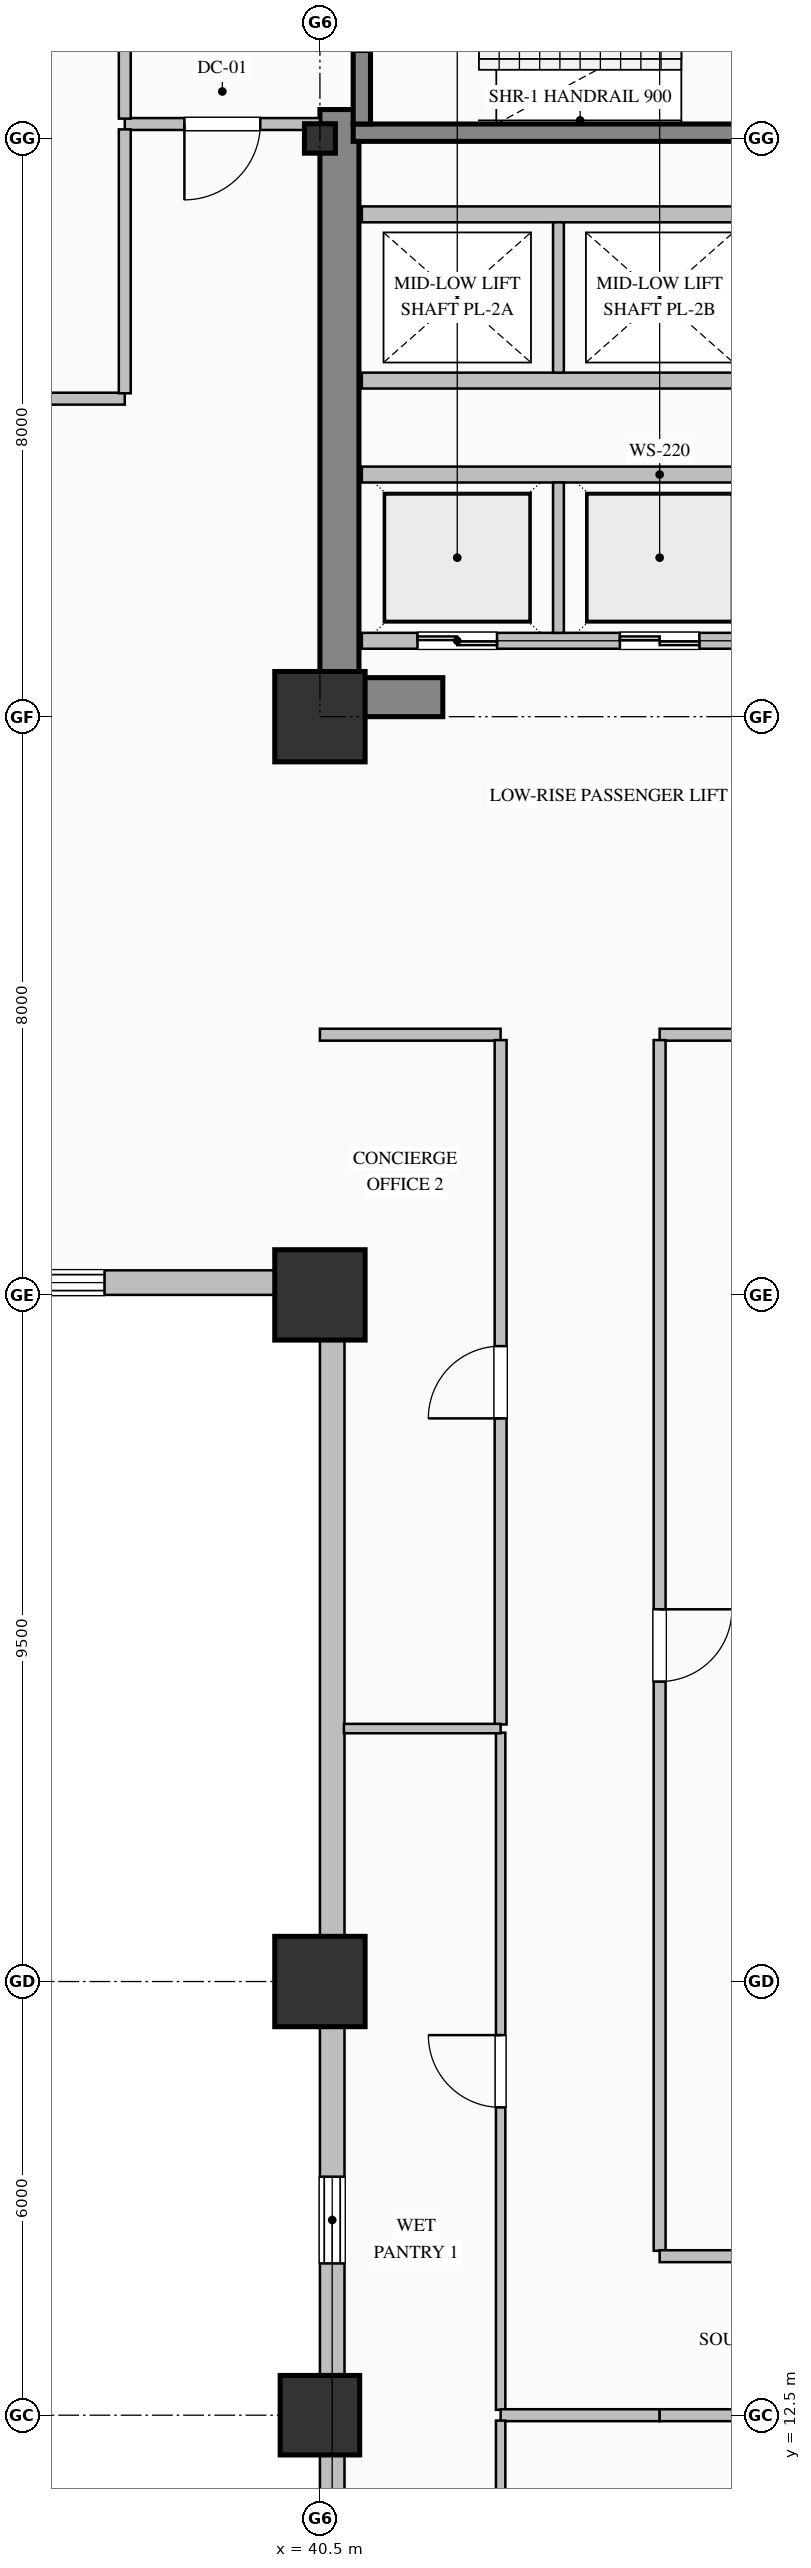
"""IFC4 building model, lengths in metres.
Left out: names, types, materials, properties, quantities, classifications, styles, units other than length and angle.
Written with IfcOpenShell. Run it as: python <this file> out.ifc"""

import sys

from ifc_helpers import new_model, si_unit, direction, frame, frame_2d, origin, origin_2d, place, context, subcontext, project, spatial, rectangle, hollow_rectangle, i_section, extrude, element, fill, save


model = new_model("IFC4")
c1 = context("Model", 3, precision=1e-05, world=origin(), true_north=direction((0.0, 1.0)))
c2 = subcontext(c1, "Body", "Model", "MODEL_VIEW")
j1 = project(units=[si_unit("LENGTHUNIT", "METRE"), si_unit("PLANEANGLEUNIT", "RADIAN")], contexts=[c1])
p1 = place(None, origin())
s1 = spatial("IfcSite", under=j1, at=p1, CompositionType="ELEMENT")
p2 = place(p1, origin())
s2 = spatial("IfcBuilding", under=s1, at=p2, CompositionType="ELEMENT")
p3 = place(p2, frame((0.0, 0.0, 68.2)))
s3 = spatial("IfcBuildingStorey", under=s2, at=p3, CompositionType="ELEMENT", Elevation=68.2)
p4 = place(p3, frame((40.77, 36.54, 0.0), z_axis=(0.0, 0.0, 1.0), x_axis=(0.0, 1.0, 0.0)))
e1 = element("IfcWall", 1, at=p4, inside=s3, PredefinedType="SHEAR", context=c2, shape_type="SweptSolid", body=[
    extrude(rectangle(XDim=7.86, YDim=0.54, at=frame_2d((3.93, 0.0))), origin(), (0.0, 0.0, 1.0), 3.75),
])
p5 = place(p3, frame((40.5, 36.27, 0.0), z_axis=(0.0, 0.0, 1.0), x_axis=(1.0, 0.0, 0.0)))
e2 = element("IfcWall", 2, at=p5, inside=s3, PredefinedType="SHEAR", context=c2, shape_type="SweptSolid", body=[
    extrude(rectangle(XDim=1.7, YDim=0.54, at=frame_2d((0.85, 0.0))), origin(), (0.0, 0.0, 1.0), 3.75),
])
p6 = place(p3, frame((40.5, 12.5, 0.0), z_axis=(0.0, 0.0, 1.0), x_axis=(1.0, 0.0, 0.0)))
e3 = element("IfcColumn", 3, at=p6, inside=s3, PredefinedType="COLUMN", context=c2, shape_type="SweptSolid", body=[
    extrude(hollow_rectangle(XDim=1.1, YDim=1.1, WallThickness=0.04, at=origin_2d()), origin(), (0.0, 0.0, 1.0), 4.0),
])
for number, where, z_axis, x_axis in (
    (4, (40.5, 18.5, 0.0), (0.0, 0.0, 1.0), (1.0, 0.0, 0.0)),
    (5, (40.5, 28.0, 0.0), (0.0, 0.0, 1.0), (1.0, 0.0, 0.0)),
    (6, (40.5, 36.0, 0.0), (0.0, 0.0, 1.0), (1.0, 0.0, 0.0)),
):
    element("IfcColumn", number, at=place(p3, frame(where, z_axis=z_axis, x_axis=x_axis)), inside=s3, PredefinedType="COLUMN", context=c2, shape_type="SweptSolid", body=[
        extrude(hollow_rectangle(XDim=1.25, YDim=1.25, WallThickness=0.045, at=origin_2d()), origin(), (0.0, 0.0, 1.0), 4.0),
    ])
p7 = place(p3, frame((40.5, 44.0, 0.0), z_axis=(0.0, 0.0, 1.0), x_axis=(1.0, 0.0, 0.0)))
e7 = element("IfcColumn", 7, at=p7, inside=s3, PredefinedType="COLUMN", context=c2, shape_type="SweptSolid", body=[
    extrude(i_section(OverallWidth=0.407, OverallDepth=0.428, WebThickness=0.02, FlangeThickness=0.035, FilletRadius=0.022, at=origin_2d()), origin(), (0.0, 0.0, 1.0), 4.0),
])
p8 = place(p3, frame((40.67, 8.0, 0.0), z_axis=(0.0, 0.0, 1.0), x_axis=(0.0, 1.0, 0.0)))
e8 = element("IfcWall", 8, at=p8, inside=s3, PredefinedType="SOLIDWALL", context=c2, shape_type="SweptSolid", body=[
    extrude(rectangle(XDim=20.34, YDim=0.34, at=frame_2d((10.17, 0.0))), origin(), (0.0, 0.0, 1.0), 3.05),
])
p9 = place(p8, frame((6.6, 0.0, 0.7)))
e9 = element("IfcOpeningElement", 9, at=p9, cuts=e8, PredefinedType="OPENING", context=c2, shape_type="SweptSolid", body=[
    extrude(rectangle(XDim=1.2, YDim=1.85, at=frame_2d((0.6, 0.925))), frame((0.0, 0.18, 0.0), z_axis=(0.0, -1.0, 0.0), x_axis=(1.0, 0.0, 0.0)), (0.0, 0.0, 1.0), 0.36),
])
p10 = place(p3, frame((40.52, 28.17, 0.0), z_axis=(0.0, 0.0, 1.0), x_axis=(-1.0, 0.0, 0.0)))
e10 = element("IfcWall", 10, at=p10, inside=s3, PredefinedType="SOLIDWALL", context=c2, shape_type="SweptSolid", body=[
    extrude(rectangle(XDim=36.52, YDim=0.34, at=frame_2d((18.26, 0.0))), origin(), (0.0, 0.0, 1.0), 3.05),
])
p11 = place(p10, frame((3.0, 0.0, 0.7)))
e11 = element("IfcOpeningElement", 11, at=p11, cuts=e10, PredefinedType="OPENING", context=c2, shape_type="SweptSolid", body=[
    extrude(rectangle(XDim=1.2, YDim=1.85, at=frame_2d((0.6, 0.925))), frame((0.0, 0.18, 0.0), z_axis=(0.0, -1.0, 0.0), x_axis=(1.0, 0.0, 0.0)), (0.0, 0.0, 1.0), 0.36),
])
p12 = place(p10, frame((10.2, 0.0, 0.7)))
e12 = element("IfcOpeningElement", 12, at=p12, cuts=e10, PredefinedType="OPENING", context=c2, shape_type="SweptSolid", body=[
    extrude(rectangle(XDim=1.2, YDim=1.85, at=frame_2d((0.6, 0.925))), frame((0.0, 0.18, 0.0), z_axis=(0.0, -1.0, 0.0), x_axis=(1.0, 0.0, 0.0)), (0.0, 0.0, 1.0), 0.36),
])
p13 = place(p10, frame((13.8, 0.0, 0.7)))
e13 = element("IfcOpeningElement", 13, at=p13, cuts=e10, PredefinedType="OPENING", context=c2, shape_type="SweptSolid", body=[
    extrude(rectangle(XDim=1.2, YDim=1.85, at=frame_2d((0.6, 0.925))), frame((0.0, 0.18, 0.0), z_axis=(0.0, -1.0, 0.0), x_axis=(1.0, 0.0, 0.0)), (0.0, 0.0, 1.0), 0.36),
])
p14 = place(p10, frame((17.4, 0.0, 0.7)))
e14 = element("IfcOpeningElement", 14, at=p14, cuts=e10, PredefinedType="OPENING", context=c2, shape_type="SweptSolid", body=[
    extrude(rectangle(XDim=1.2, YDim=1.85, at=frame_2d((0.6, 0.925))), frame((0.0, 0.18, 0.0), z_axis=(0.0, -1.0, 0.0), x_axis=(1.0, 0.0, 0.0)), (0.0, 0.0, 1.0), 0.36),
])
p15 = place(p10, frame((21.0, 0.0, 0.7)))
e15 = element("IfcOpeningElement", 15, at=p15, cuts=e10, PredefinedType="OPENING", context=c2, shape_type="SweptSolid", body=[
    extrude(rectangle(XDim=1.2, YDim=1.85, at=frame_2d((0.6, 0.925))), frame((0.0, 0.18, 0.0), z_axis=(0.0, -1.0, 0.0), x_axis=(1.0, 0.0, 0.0)), (0.0, 0.0, 1.0), 0.36),
])
p16 = place(p10, frame((28.2, 0.0, 0.7)))
e16 = element("IfcOpeningElement", 16, at=p16, cuts=e10, PredefinedType="OPENING", context=c2, shape_type="SweptSolid", body=[
    extrude(rectangle(XDim=1.2, YDim=1.85, at=frame_2d((0.6, 0.925))), frame((0.0, 0.18, 0.0), z_axis=(0.0, -1.0, 0.0), x_axis=(1.0, 0.0, 0.0)), (0.0, 0.0, 1.0), 0.36),
])
p17 = place(p3, frame((49.04, 44.08, 0.0), z_axis=(0.0, 0.0, 1.0), x_axis=(-1.0, 0.0, 0.0)))
e17 = element("IfcWall", 17, at=p17, inside=s3, PredefinedType="SOLIDWALL", context=c2, shape_type="SweptSolid", body=[
    extrude(rectangle(XDim=8.08, YDim=0.24, at=frame_2d((4.04, 0.0))), origin(), (0.0, 0.0, 1.0), 4.0),
])
p18 = place(p3, frame((41.08, 47.35, 0.0), z_axis=(0.0, 0.0, 1.0), x_axis=(0.0, -1.0, 0.0)))
e18 = element("IfcWall", 18, at=p18, inside=s3, PredefinedType="SOLIDWALL", context=c2, shape_type="SweptSolid", body=[
    extrude(rectangle(XDim=3.15, YDim=0.24, at=frame_2d((1.575, 0.0))), origin(), (0.0, 0.0, 1.0), 4.0),
])
p19 = place(p18, frame((1.0, 0.0, 0.0)))
e19 = element("IfcOpeningElement", 19, at=p19, cuts=e18, PredefinedType="OPENING", context=c2, shape_type="SweptSolid", body=[
    extrude(rectangle(XDim=1.15, YDim=2.2, at=frame_2d((0.575, 1.1))), frame((0.0, 0.13, 0.0), z_axis=(0.0, -1.0, 0.0), x_axis=(1.0, 0.0, 0.0)), (0.0, 0.0, 1.0), 0.26),
])
p20 = place(p3, frame((49.32, 37.05, 0.0), z_axis=(0.0, 0.0, 1.0), x_axis=(-1.0, 0.0, 0.0)))
e20 = element("IfcWall", 20, at=p20, inside=s3, PredefinedType="PARTITIONING", context=c2, shape_type="SweptSolid", body=[
    extrude(rectangle(XDim=8.24, YDim=0.22, at=frame_2d((4.12, 0.0))), origin(), (0.0, 0.0, 1.0), 3.75),
])
p21 = place(p20, frame((6.37, 0.0, 0.0)))
e21 = element("IfcOpeningElement", 21, at=p21, cuts=e20, PredefinedType="OPENING", context=c2, shape_type="SweptSolid", body=[
    extrude(rectangle(XDim=1.1, YDim=2.2, at=frame_2d((0.55, 1.1))), frame((0.0, 0.12, 0.0), z_axis=(0.0, -1.0, 0.0), x_axis=(1.0, 0.0, 0.0)), (0.0, 0.0, 1.0), 0.24),
])
p22 = place(p20, frame((3.57, 0.0, 0.0)))
e22 = element("IfcOpeningElement", 22, at=p22, cuts=e20, PredefinedType="OPENING", context=c2, shape_type="SweptSolid", body=[
    extrude(rectangle(XDim=1.1, YDim=2.2, at=frame_2d((0.55, 1.1))), frame((0.0, 0.12, 0.0), z_axis=(0.0, -1.0, 0.0), x_axis=(1.0, 0.0, 0.0)), (0.0, 0.0, 1.0), 0.24),
])
p23 = place(p20, frame((0.77, 0.0, 0.0)))
e23 = element("IfcOpeningElement", 23, at=p23, cuts=e20, PredefinedType="OPENING", context=c2, shape_type="SweptSolid", body=[
    extrude(rectangle(XDim=1.1, YDim=2.2, at=frame_2d((0.55, 1.1))), frame((0.0, 0.12, 0.0), z_axis=(0.0, -1.0, 0.0), x_axis=(1.0, 0.0, 0.0)), (0.0, 0.0, 1.0), 0.24),
])
p24 = place(p3, frame((41.08, 39.35, 0.0), z_axis=(0.0, 0.0, 1.0), x_axis=(1.0, 0.0, 0.0)))
e24 = element("IfcWall", 24, at=p24, inside=s3, PredefinedType="PARTITIONING", context=c2, shape_type="SweptSolid", body=[
    extrude(rectangle(XDim=8.24, YDim=0.22, at=frame_2d((4.12, 0.0))), origin(), (0.0, 0.0, 1.0), 3.75),
])
p25 = place(p3, frame((43.8, 37.16, 0.0), z_axis=(0.0, 0.0, 1.0), x_axis=(0.0, 1.0, 0.0)))
e25 = element("IfcWall", 25, at=p25, inside=s3, PredefinedType="PARTITIONING", context=c2, shape_type="SweptSolid", body=[
    extrude(rectangle(XDim=2.08, YDim=0.15, at=frame_2d((1.04, 0.0))), origin(), (0.0, 0.0, 1.0), 3.75),
])
for number, where, z_axis, x_axis in (
    (26, (49.32, 40.65, 0.0), (0.0, 0.0, 1.0), (-1.0, 0.0, 0.0)),
    (27, (41.08, 42.95, 0.0), (0.0, 0.0, 1.0), (1.0, 0.0, 0.0)),
):
    element("IfcWall", number, at=place(p3, frame(where, z_axis=z_axis, x_axis=x_axis)), inside=s3, PredefinedType="PARTITIONING", context=c2, shape_type="SweptSolid", body=[
        extrude(rectangle(XDim=8.24, YDim=0.22, at=frame_2d((4.12, 0.0))), origin(), (0.0, 0.0, 1.0), 3.75),
    ])
p26 = place(p3, frame((43.8, 40.76, 0.0), z_axis=(0.0, 0.0, 1.0), x_axis=(0.0, 1.0, 0.0)))
e28 = element("IfcWall", 28, at=p26, inside=s3, PredefinedType="PARTITIONING", context=c2, shape_type="SweptSolid", body=[
    extrude(rectangle(XDim=2.08, YDim=0.15, at=frame_2d((1.04, 0.0))), origin(), (0.0, 0.0, 1.0), 3.75),
])
p27 = place(p3, frame((40.5, 44.2, 0.0), z_axis=(0.0, 0.0, 1.0), x_axis=(-1.0, 0.0, 0.0)))
e29 = element("IfcWall", 29, at=p27, inside=s3, PredefinedType="PARTITIONING", context=c2, shape_type="SweptSolid", body=[
    extrude(rectangle(XDim=2.7, YDim=0.165, at=frame_2d((1.35, 0.0))), origin(), (0.0, 0.0, 1.0), 3.75),
])
p28 = place(p27, frame((0.825, 0.0, 0.0)))
e30 = element("IfcOpeningElement", 30, at=p28, cuts=e29, PredefinedType="OPENING", context=c2, shape_type="SweptSolid", body=[
    extrude(rectangle(XDim=1.05, YDim=2.15, at=frame_2d((0.525, 1.075))), frame((0.0, 0.093, 0.0), z_axis=(0.0, -1.0, 0.0), x_axis=(1.0, 0.0, 0.0)), (0.0, 0.0, 1.0), 0.185),
])
p29 = place(p3, frame((37.8, 44.274, 0.0), z_axis=(0.0, 0.0, 1.0), x_axis=(0.0, 1.0, 0.0)))
e31 = element("IfcWall", 31, at=p29, inside=s3, PredefinedType="PARTITIONING", context=c2, shape_type="SweptSolid", body=[
    extrude(rectangle(XDim=3.051, YDim=0.165, at=frame_2d((1.525, 0.0))), origin(), (0.0, 0.0, 1.0), 3.75),
])
p30 = place(p3, frame((24.5, 40.4, 0.0), z_axis=(0.0, 0.0, 1.0), x_axis=(1.0, 0.0, 0.0)))
e32 = element("IfcWall", 32, at=p30, inside=s3, PredefinedType="PARTITIONING", context=c2, shape_type="SweptSolid", body=[
    extrude(rectangle(XDim=13.3, YDim=0.165, at=frame_2d((6.65, 0.0))), origin(), (0.0, 0.0, 1.0), 3.75),
])
p31 = place(p30, frame((6.15, 0.0, 0.0)))
e33 = element("IfcOpeningElement", 33, at=p31, cuts=e32, PredefinedType="OPENING", context=c2, shape_type="SweptSolid", body=[
    extrude(rectangle(XDim=1.0, YDim=2.15, at=frame_2d((0.5, 1.075))), frame((0.0, 0.093, 0.0), z_axis=(0.0, -1.0, 0.0), x_axis=(1.0, 0.0, 0.0)), (0.0, 0.0, 1.0), 0.185),
])
p32 = place(p3, frame((37.8, 40.475, 0.0), z_axis=(0.0, 0.0, 1.0), x_axis=(0.0, 1.0, 0.0)))
e34 = element("IfcWall", 34, at=p32, inside=s3, PredefinedType="PARTITIONING", context=c2, shape_type="SweptSolid", body=[
    extrude(rectangle(XDim=3.651, YDim=0.165, at=frame_2d((1.825, 0.0))), origin(), (0.0, 0.0, 1.0), 3.75),
])
p33 = place(p3, frame((51.5, 31.6, 0.0), z_axis=(0.0, 0.0, 1.0), x_axis=(-1.0, 0.0, 0.0)))
e35 = element("IfcWall", 35, at=p33, inside=s3, PredefinedType="PARTITIONING", context=c2, shape_type="SweptSolid", body=[
    extrude(rectangle(XDim=6.3, YDim=0.165, at=frame_2d((3.15, 0.0))), origin(), (0.0, 0.0, 1.0), 3.75),
])
p34 = place(p3, frame((43.0, 31.6, 0.0), z_axis=(0.0, 0.0, 1.0), x_axis=(-1.0, 0.0, 0.0)))
e36 = element("IfcWall", 36, at=p34, inside=s3, PredefinedType="PARTITIONING", context=c2, shape_type="SweptSolid", body=[
    extrude(rectangle(XDim=2.5, YDim=0.165, at=frame_2d((1.25, 0.0))), origin(), (0.0, 0.0, 1.0), 3.75),
])
p35 = place(p3, frame((45.2, 31.525, 0.0), z_axis=(0.0, 0.0, 1.0), x_axis=(0.0, -1.0, 0.0)))
e37 = element("IfcWall", 37, at=p35, inside=s3, PredefinedType="PARTITIONING", context=c2, shape_type="SweptSolid", body=[
    extrude(rectangle(XDim=16.751, YDim=0.165, at=frame_2d((8.375, 0.0))), origin(), (0.0, 0.0, 1.0), 3.75),
])
p36 = place(p35, frame((7.875, 0.0, 0.0)))
e38 = element("IfcOpeningElement", 38, at=p36, cuts=e37, PredefinedType="OPENING", context=c2, shape_type="SweptSolid", body=[
    extrude(rectangle(XDim=1.0, YDim=2.15, at=frame_2d((0.5, 1.075))), frame((0.0, 0.093, 0.0), z_axis=(0.0, -1.0, 0.0), x_axis=(1.0, 0.0, 0.0)), (0.0, 0.0, 1.0), 0.185),
])
p37 = place(p3, frame((43.0, 12.574, 0.0), z_axis=(0.0, 0.0, 1.0), x_axis=(0.0, 1.0, 0.0)))
e39 = element("IfcWall", 39, at=p37, inside=s3, PredefinedType="PARTITIONING", context=c2, shape_type="SweptSolid", body=[
    extrude(rectangle(XDim=9.369, YDim=0.13, at=frame_2d((4.684, 0.0))), origin(), (0.0, 0.0, 1.0), 3.75),
])
p38 = place(p37, frame((4.184, 0.0, 0.0)))
e40 = element("IfcOpeningElement", 40, at=p38, cuts=e39, PredefinedType="OPENING", context=c2, shape_type="SweptSolid", body=[
    extrude(rectangle(XDim=1.0, YDim=2.15, at=frame_2d((0.5, 1.075))), frame((0.0, 0.075, 0.0), z_axis=(0.0, -1.0, 0.0), x_axis=(1.0, 0.0, 0.0)), (0.0, 0.0, 1.0), 0.15),
])
p39 = place(p3, frame((43.0, 22.057, 0.0), z_axis=(0.0, 0.0, 1.0), x_axis=(0.0, 1.0, 0.0)))
e41 = element("IfcWall", 41, at=p39, inside=s3, PredefinedType="PARTITIONING", context=c2, shape_type="SweptSolid", body=[
    extrude(rectangle(XDim=9.469, YDim=0.165, at=frame_2d((4.734, 0.0))), origin(), (0.0, 0.0, 1.0), 3.75),
])
p40 = place(p39, frame((4.234, 0.0, 0.0)))
e42 = element("IfcOpeningElement", 42, at=p40, cuts=e41, PredefinedType="OPENING", context=c2, shape_type="SweptSolid", body=[
    extrude(rectangle(XDim=1.0, YDim=2.15, at=frame_2d((0.5, 1.075))), frame((0.0, 0.093, 0.0), z_axis=(0.0, -1.0, 0.0), x_axis=(1.0, 0.0, 0.0)), (0.0, 0.0, 1.0), 0.185),
])
p41 = place(p3, frame((45.2, 12.5, 0.0), z_axis=(0.0, 0.0, 1.0), x_axis=(-1.0, 0.0, 0.0)))
e43 = element("IfcWall", 43, at=p41, inside=s3, PredefinedType="PARTITIONING", context=c2, shape_type="SweptSolid", body=[
    extrude(rectangle(XDim=2.2, YDim=0.165, at=frame_2d((1.1, 0.0))), origin(), (0.0, 0.0, 1.0), 3.042),
])
p42 = place(p3, frame((45.2, 14.7, 0.0), z_axis=(0.0, 0.0, 1.0), x_axis=(1.0, 0.0, 0.0)))
e44 = element("IfcWall", 44, at=p42, inside=s3, PredefinedType="PARTITIONING", context=c2, shape_type="SweptSolid", body=[
    extrude(rectangle(XDim=6.3, YDim=0.165, at=frame_2d((3.15, 0.0))), origin(), (0.0, 0.0, 1.0), 3.75),
])
p43 = place(p3, frame((53.5, 12.5, 0.0), z_axis=(0.0, 0.0, 1.0), x_axis=(-1.0, 0.0, 0.0)))
e45 = element("IfcWall", 45, at=p43, inside=s3, PredefinedType="PARTITIONING", context=c2, shape_type="SweptSolid", body=[
    extrude(rectangle(XDim=8.3, YDim=0.165, at=frame_2d((4.15, 0.0))), origin(), (0.0, 0.0, 1.0), 3.042),
])
p44 = place(p43, frame((3.65, 0.0, 0.0)))
e46 = element("IfcOpeningElement", 46, at=p44, cuts=e45, PredefinedType="OPENING", context=c2, shape_type="SweptSolid", body=[
    extrude(rectangle(XDim=1.0, YDim=2.15, at=frame_2d((0.5, 1.075))), frame((0.0, 0.093, 0.0), z_axis=(0.0, -1.0, 0.0), x_axis=(1.0, 0.0, 0.0)), (0.0, 0.0, 1.0), 0.185),
])
p45 = place(p3, frame((40.832, 22.0, 0.0), z_axis=(0.0, 0.0, 1.0), x_axis=(1.0, 0.0, 0.0)))
e47 = element("IfcWall", 47, at=p45, inside=s3, PredefinedType="PARTITIONING", context=c2, shape_type="SweptSolid", body=[
    extrude(rectangle(XDim=2.168, YDim=0.13, at=frame_2d((1.084, 0.0))), origin(), (0.0, 0.0, 1.0), 3.75),
])
p46 = place(p3, frame((43.0, 12.426, 0.0), z_axis=(0.0, 0.0, 1.0), x_axis=(0.0, -1.0, 0.0)))
e48 = element("IfcWall", 48, at=p46, inside=s3, PredefinedType="PARTITIONING", context=c2, shape_type="SweptSolid", body=[
    extrude(rectangle(XDim=6.456, YDim=0.13, at=frame_2d((3.228, 0.0))), origin(), (0.0, 0.0, 1.0), 3.75),
])
p47 = place(p9, origin())
e49 = element("IfcWindow", 49, at=p47, inside=s3, PartitioningType="DOUBLE_PANEL_VERTICAL", PredefinedType="WINDOW", context=c2, shape_type="SweptSolid", body=[
    extrude(rectangle(XDim=1.2, YDim=1.85, at=frame_2d((0.6, 0.925))), frame((0.0, 0.15, 0.0), z_axis=(0.0, -1.0, 0.0), x_axis=(1.0, 0.0, 0.0)), (0.0, 0.0, 1.0), 0.06),
])
fill(e9, e49)
p48 = place(p11, origin())
e50 = element("IfcWindow", 50, at=p48, inside=s3, PartitioningType="DOUBLE_PANEL_VERTICAL", PredefinedType="WINDOW", context=c2, shape_type="SweptSolid", body=[
    extrude(rectangle(XDim=1.2, YDim=1.85, at=frame_2d((0.6, 0.925))), frame((0.0, 0.15, 0.0), z_axis=(0.0, -1.0, 0.0), x_axis=(1.0, 0.0, 0.0)), (0.0, 0.0, 1.0), 0.06),
])
fill(e11, e50)
p49 = place(p21, origin())
e51 = element("IfcDoor", 51, at=p49, inside=s3, OperationType="DOUBLE_DOOR_SLIDING", PredefinedType="DOOR", context=c2, shape_type="SweptSolid", body=[
    extrude(rectangle(XDim=1.1, YDim=2.2, at=frame_2d((0.55, 1.1))), frame((0.0, 0.025, 0.0), z_axis=(0.0, -1.0, 0.0), x_axis=(1.0, 0.0, 0.0)), (0.0, 0.0, 1.0), 0.05),
])
fill(e21, e51)
p50 = place(p22, origin())
e52 = element("IfcDoor", 52, at=p50, inside=s3, OperationType="DOUBLE_DOOR_SLIDING", PredefinedType="DOOR", context=c2, shape_type="SweptSolid", body=[
    extrude(rectangle(XDim=1.1, YDim=2.2, at=frame_2d((0.55, 1.1))), frame((0.0, 0.025, 0.0), z_axis=(0.0, -1.0, 0.0), x_axis=(1.0, 0.0, 0.0)), (0.0, 0.0, 1.0), 0.05),
])
fill(e22, e52)
p51 = place(p28, origin())
e53 = element("IfcDoor", 53, at=p51, inside=s3, OperationType="SINGLE_SWING_RIGHT", PredefinedType="DOOR", context=c2, shape_type="SweptSolid", body=[
    extrude(rectangle(XDim=1.05, YDim=2.15, at=frame_2d((0.525, 1.075))), frame((0.0, 0.025, 0.0), z_axis=(0.0, -1.0, 0.0), x_axis=(1.0, 0.0, 0.0)), (0.0, 0.0, 1.0), 0.05),
])
fill(e30, e53)
p52 = place(p36, origin())
e54 = element("IfcDoor", 54, at=p52, inside=s3, OperationType="SINGLE_SWING_LEFT", PredefinedType="DOOR", context=c2, shape_type="SweptSolid", body=[
    extrude(rectangle(XDim=1.0, YDim=2.15, at=frame_2d((0.5, 1.075))), frame((0.0, 0.025, 0.0), z_axis=(0.0, -1.0, 0.0), x_axis=(1.0, 0.0, 0.0)), (0.0, 0.0, 1.0), 0.05),
])
fill(e38, e54)
p53 = place(p38, origin())
e55 = element("IfcDoor", 55, at=p53, inside=s3, OperationType="SINGLE_SWING_RIGHT", PredefinedType="DOOR", context=c2, shape_type="SweptSolid", body=[
    extrude(rectangle(XDim=1.0, YDim=2.15, at=frame_2d((0.5, 1.075))), frame((0.0, 0.025, 0.0), z_axis=(0.0, -1.0, 0.0), x_axis=(1.0, 0.0, 0.0)), (0.0, 0.0, 1.0), 0.05),
])
fill(e40, e55)
p54 = place(p40, origin())
e56 = element("IfcDoor", 56, at=p54, inside=s3, OperationType="SINGLE_SWING_LEFT", PredefinedType="DOOR", context=c2, shape_type="SweptSolid", body=[
    extrude(rectangle(XDim=1.0, YDim=2.15, at=frame_2d((0.5, 1.075))), frame((0.0, 0.025, 0.0), z_axis=(0.0, -1.0, 0.0), x_axis=(1.0, 0.0, 0.0)), (0.0, 0.0, 1.0), 0.05),
])
fill(e42, e56)
save(model, sys.argv[1])
